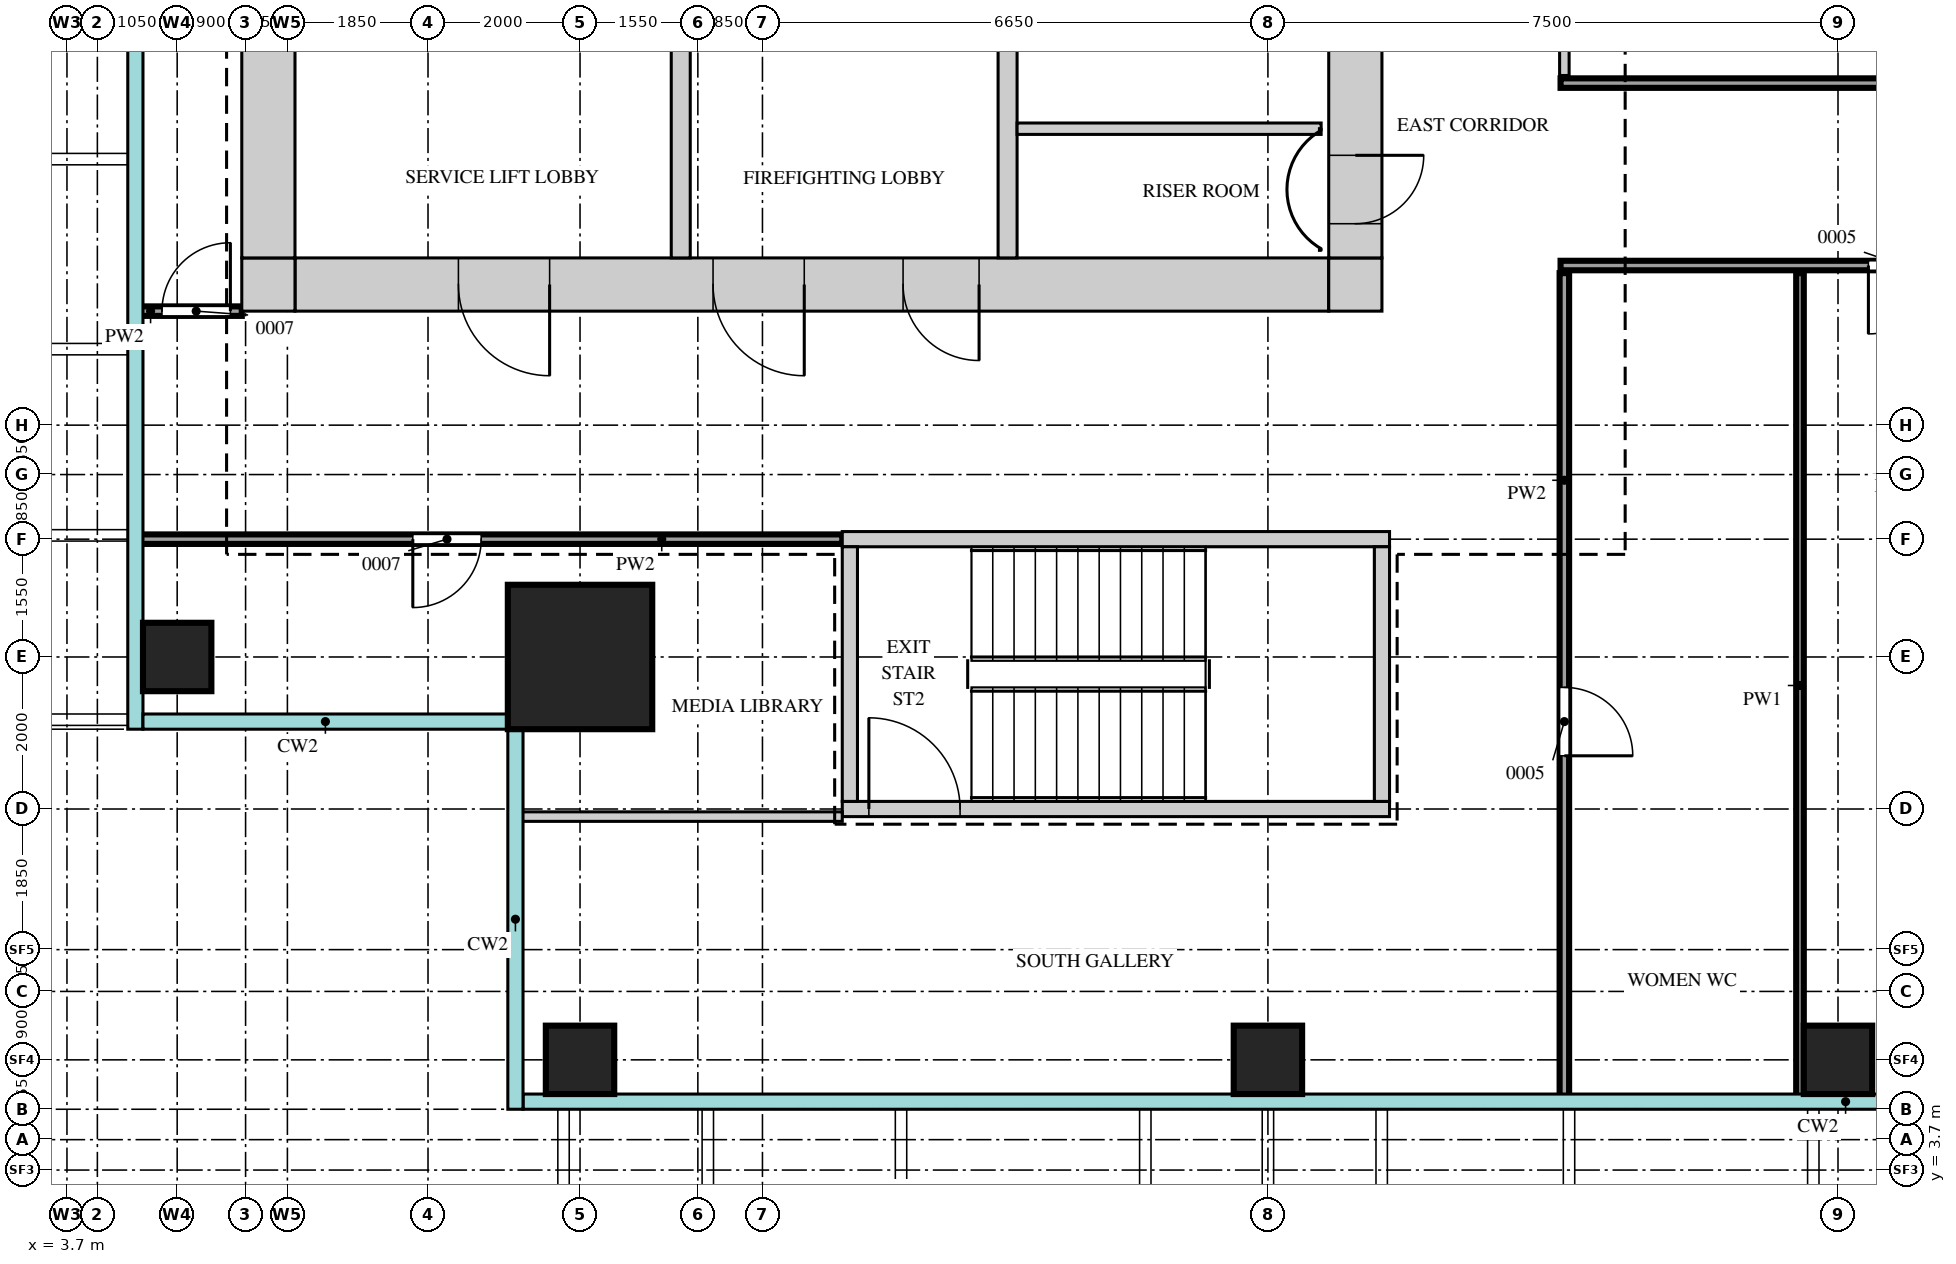
"""IFC4 building model, lengths in metres.
Left out: names, types, materials, properties, quantities, classifications, styles, units other than length and angle.
Written with IfcOpenShell. Run it as: python <this file> out.ifc"""

import sys

from ifc_helpers import new_model, si_unit, direction, frame, frame_2d, origin, origin_2d, place, context, subcontext, project, spatial, rectangle, extrude, source, transform, mapped, element, fill, save


model = new_model("IFC4")
c1 = context("Model", 3, precision=1e-05, world=origin(), true_north=direction((0.0, 1.0)))
c2 = subcontext(c1, "Body", "Model", "MODEL_VIEW")
j1 = project(units=[si_unit("LENGTHUNIT", "METRE"), si_unit("PLANEANGLEUNIT", "RADIAN")], contexts=[c1])
p1 = place(None, origin())
s1 = spatial("IfcSite", under=j1, at=p1, CompositionType="ELEMENT")
p2 = place(p1, origin())
s2 = spatial("IfcBuilding", under=s1, at=p2, CompositionType="ELEMENT")
p3 = place(p2, frame((0.0, 0.0, 246.2)))
s3 = spatial("IfcBuildingStorey", under=s2, at=p3, CompositionType="ELEMENT", Elevation=246.2)
m1 = source(origin(), c2, "Body", "SweptSolid", [
    extrude(rectangle(XDim=13.6, YDim=0.7, at=frame_2d((6.8, 0.0))), origin(), (0.0, 0.0, 1.0), 3.75),
])
p4 = place(p3, frame((6.7, 15.35, 0.0), z_axis=(0.0, 0.0, 1.0), x_axis=(1.0, 0.0, 0.0)))
e1 = element("IfcWall", 1, at=p4, inside=s3, PredefinedType="SHEAR", context=c2, shape_type="MappedRepresentation", body=[
    mapped(m1, transform((0.0, 0.0, 0.0))),
])
m2 = source(origin(), c2, "Body", "SweptSolid", [
    extrude(rectangle(XDim=1.2, YDim=2.1, at=frame_2d((0.6, 1.05))), frame((0.0, 0.36, 0.0), z_axis=(0.0, -1.0, 0.0), x_axis=(1.0, 0.0, 0.0)), (0.0, 0.0, 1.0), 0.72),
])
p5 = place(p4, frame((5.5, 0.0, 0.0)))
e2 = element("IfcOpeningElement", 2, at=p5, cuts=e1, PredefinedType="OPENING", context=c2, shape_type="MappedRepresentation", body=[
    mapped(m2, transform((0.0, 0.0, 0.0))),
])
p6 = place(p4, frame((2.15, 0.0, 0.0)))
e3 = element("IfcOpeningElement", 3, at=p6, cuts=e1, PredefinedType="OPENING", context=c2, shape_type="MappedRepresentation", body=[
    mapped(m2, transform((0.0, 0.0, 0.0))),
])
m3 = source(origin(), c2, "Body", "SweptSolid", [
    extrude(rectangle(XDim=1.0, YDim=2.1, at=frame_2d((0.5, 1.05))), frame((0.0, 0.36, 0.0), z_axis=(0.0, -1.0, 0.0), x_axis=(1.0, 0.0, 0.0)), (0.0, 0.0, 1.0), 0.72),
])
p7 = place(p4, frame((8.0, 0.0, 0.0)))
e4 = element("IfcOpeningElement", 4, at=p7, cuts=e1, PredefinedType="OPENING", context=c2, shape_type="MappedRepresentation", body=[
    mapped(m3, transform((0.0, 0.0, 0.0))),
])
m4 = source(origin(), c2, "Body", "SweptSolid", [
    extrude(rectangle(XDim=0.7, YDim=0.7, at=frame_2d((0.35, 0.0))), origin(), (0.0, 0.0, 1.0), 3.75),
])
for number, where, z_axis, x_axis in (
    (5, (20.3, 15.35, 0.0), (0.0, 0.0, 1.0), (1.0, 0.0, 0.0)),
    (6, (6.0, 15.35, 0.0), (0.0, 0.0, 1.0), (1.0, 0.0, 0.0)),
):
    element("IfcWall", number, at=place(p3, frame(where, z_axis=z_axis, x_axis=x_axis)), inside=s3, PredefinedType="SHEAR", context=c2, shape_type="MappedRepresentation", body=[
        mapped(m4, transform((0.0, 0.0, 0.0))),
    ])
m5 = source(origin(), c2, "Body", "SweptSolid", [
    extrude(rectangle(XDim=22.6, YDim=0.7, at=frame_2d((11.3, 0.0))), origin(), (0.0, 0.0, 1.0), 3.75),
])
p8 = place(p3, frame((20.65, 15.7, 0.0), z_axis=(0.0, 0.0, 1.0), x_axis=(0.0, 1.0, 0.0)))
e7 = element("IfcWall", 7, at=p8, inside=s3, PredefinedType="SHEAR", context=c2, shape_type="MappedRepresentation", body=[
    mapped(m5, transform((0.0, 0.0, 0.0))),
])
m6 = source(origin(), c2, "Body", "SweptSolid", [
    extrude(rectangle(XDim=1.8, YDim=2.1, at=frame_2d((0.9, 1.05))), frame((0.0, 0.36, 0.0), z_axis=(0.0, -1.0, 0.0), x_axis=(1.0, 0.0, 0.0)), (0.0, 0.0, 1.0), 0.72),
])
p9 = place(p8, frame((10.8, 0.0, 0.0)))
e8 = element("IfcOpeningElement", 8, at=p9, cuts=e7, PredefinedType="OPENING", context=c2, shape_type="MappedRepresentation", body=[
    mapped(m6, transform((0.0, 0.0, 0.0))),
])
m7 = source(origin(), c2, "Body", "SweptSolid", [
    extrude(rectangle(XDim=0.9, YDim=2.1, at=frame_2d((0.45, 1.05))), frame((0.0, 0.36, 0.0), z_axis=(0.0, -1.0, 0.0), x_axis=(1.0, 0.0, 0.0)), (0.0, 0.0, 1.0), 0.72),
])
p10 = place(p8, frame((0.45, 0.0, 0.0)))
e9 = element("IfcOpeningElement", 9, at=p10, cuts=e7, PredefinedType="OPENING", context=c2, shape_type="MappedRepresentation", body=[
    mapped(m7, transform((0.0, 0.0, 0.0))),
])
p11 = place(p8, frame((2.9, 0.0, 0.0)))
e10 = element("IfcOpeningElement", 10, at=p11, cuts=e7, PredefinedType="OPENING", context=c2, shape_type="MappedRepresentation", body=[
    mapped(m7, transform((0.0, 0.0, 0.0))),
])
p12 = place(p8, frame((5.65, 0.0, 0.0)))
e11 = element("IfcOpeningElement", 11, at=p12, cuts=e7, PredefinedType="OPENING", context=c2, shape_type="MappedRepresentation", body=[
    mapped(m7, transform((0.0, 0.0, 0.0))),
])
p13 = place(p3, frame((6.35, 15.7, 0.0), z_axis=(0.0, 0.0, 1.0), x_axis=(0.0, 1.0, 0.0)))
e12 = element("IfcWall", 12, at=p13, inside=s3, PredefinedType="SHEAR", context=c2, shape_type="MappedRepresentation", body=[
    mapped(m5, transform((0.0, 0.0, 0.0))),
])
m8 = source(origin(), c2, "Body", "SweptSolid", [
    extrude(rectangle(XDim=7.2, YDim=0.2, at=frame_2d((3.6, 0.0))), origin(), (0.0, 0.0, 1.0), 3.75),
])
p14 = place(p3, frame((13.9, 12.0, 0.0), z_axis=(0.0, 0.0, 1.0), x_axis=(1.0, 0.0, 0.0)))
e13 = element("IfcWall", 13, at=p14, inside=s3, PredefinedType="SHEAR", context=c2, shape_type="MappedRepresentation", body=[
    mapped(m8, transform((0.0, 0.0, 0.0))),
])
p15 = place(p3, frame((13.9, 8.45, 0.0), z_axis=(0.0, 0.0, 1.0), x_axis=(1.0, 0.0, 0.0)))
e14 = element("IfcWall", 14, at=p15, inside=s3, PredefinedType="SHEAR", context=c2, shape_type="MappedRepresentation", body=[
    mapped(m8, transform((0.0, 0.0, 0.0))),
])
m9 = source(origin(), c2, "Body", "SweptSolid", [
    extrude(rectangle(XDim=1.2, YDim=2.1, at=frame_2d((0.6, 1.05))), frame((0.0, 0.11, 0.0), z_axis=(0.0, -1.0, 0.0), x_axis=(1.0, 0.0, 0.0)), (0.0, 0.0, 1.0), 0.22),
])
p16 = place(p15, frame((0.35, 0.0, 0.0)))
e15 = element("IfcOpeningElement", 15, at=p16, cuts=e14, PredefinedType="OPENING", context=c2, shape_type="MappedRepresentation", body=[
    mapped(m9, transform((0.0, 0.0, 0.0))),
])
m10 = source(origin(), c2, "Body", "SweptSolid", [
    extrude(rectangle(XDim=3.35, YDim=0.2, at=frame_2d((1.675, 0.0))), origin(), (0.0, 0.0, 1.0), 3.75),
])
for number, where, z_axis, x_axis in (
    (16, (21.0, 8.55, 0.0), (0.0, 0.0, 1.0), (0.0, 1.0, 0.0)),
    (17, (14.0, 8.55, 0.0), (0.0, 0.0, 1.0), (0.0, 1.0, 0.0)),
):
    element("IfcWall", number, at=place(p3, frame(where, z_axis=z_axis, x_axis=x_axis)), inside=s3, PredefinedType="SHEAR", context=c2, shape_type="MappedRepresentation", body=[
        mapped(m10, transform((0.0, 0.0, 0.0))),
    ])
m11 = source(origin(), c2, "Body", "SweptSolid", [
    extrude(rectangle(XDim=3.5, YDim=0.25, at=frame_2d((1.75, 0.0))), origin(), (0.0, 0.0, 1.0), 3.75),
])
for number, where, z_axis, x_axis in (
    (18, (16.075, 15.7, 0.0), (0.0, 0.0, 1.0), (0.0, 1.0, 0.0)),
    (19, (11.775, 15.7, 0.0), (0.0, 0.0, 1.0), (0.0, 1.0, 0.0)),
):
    element("IfcWall", number, at=place(p3, frame(where, z_axis=z_axis, x_axis=x_axis)), inside=s3, PredefinedType="STANDARD", context=c2, shape_type="MappedRepresentation", body=[
        mapped(m11, transform((0.0, 0.0, 0.0))),
    ])
m12 = source(origin(), c2, "Body", "SweptSolid", [
    extrude(rectangle(XDim=1.9, YDim=1.9, at=origin_2d()), origin(), (0.0, 0.0, 1.0), 4.0),
])
p17 = place(p3, frame((10.45, 10.45, 0.0), z_axis=(0.0, 0.0, 1.0), x_axis=(1.0, 0.0, 0.0)))
e20 = element("IfcColumn", 20, at=p17, inside=s3, PredefinedType="COLUMN", context=c2, shape_type="MappedRepresentation", body=[
    mapped(m12, transform((0.0, 0.0, 0.0))),
])
m13 = source(origin(), c2, "Body", "SweptSolid", [
    extrude(rectangle(XDim=0.9, YDim=0.9, at=origin_2d()), origin(), (0.0, 0.0, 1.0), 3.75),
])
for number, where, z_axis, x_axis in (
    (21, (10.45, 5.15, 0.0), (0.0, 0.0, 1.0), (1.0, 0.0, 0.0)),
    (22, (19.5, 5.15, 0.0), (0.0, 0.0, 1.0), (1.0, 0.0, 0.0)),
    (23, (27.0, 5.15, 0.0), (0.0, 0.0, 1.0), (1.0, 0.0, 0.0)),
    (24, (5.15, 10.45, 0.0), (0.0, 0.0, 1.0), (1.0, 0.0, 0.0)),
):
    element("IfcColumn", number, at=place(p3, frame(where, z_axis=z_axis, x_axis=x_axis)), inside=s3, PredefinedType="COLUMN", context=c2, shape_type="MappedRepresentation", body=[
        mapped(m13, transform((0.0, 0.0, 0.0))),
    ])
m14 = source(origin(), c2, "Body", "SweptSolid", [
    extrude(rectangle(XDim=10.85, YDim=0.125, at=frame_2d((5.425, 0.0))), origin(), (0.0, 0.0, 1.0), 3.8),
])
p18 = place(p3, frame((23.4, 4.65, 0.0), z_axis=(0.0, 0.0, 1.0), x_axis=(0.0, 1.0, 0.0)))
e25 = element("IfcWall", 25, at=p18, inside=s3, PredefinedType="PARTITIONING", context=c2, shape_type="MappedRepresentation", body=[
    mapped(m14, transform((0.0, 0.0, 0.0))),
])
m15 = source(origin(), c2, "Body", "SweptSolid", [
    extrude(rectangle(XDim=0.9, YDim=2.1, at=frame_2d((0.45, 1.05))), frame((0.0, 0.073, 0.0), z_axis=(0.0, -1.0, 0.0), x_axis=(1.0, 0.0, 0.0)), (0.0, 0.0, 1.0), 0.145),
])
p19 = place(p18, frame((4.5, 0.0, 0.0)))
e26 = element("IfcOpeningElement", 26, at=p19, cuts=e25, PredefinedType="OPENING", context=c2, shape_type="MappedRepresentation", body=[
    mapped(m15, transform((0.0, 0.0, 0.0))),
])
m16 = source(origin(), c2, "Body", "SweptSolid", [
    extrude(rectangle(XDim=10.85, YDim=0.1, at=frame_2d((5.425, 0.0))), origin(), (0.0, 0.0, 1.0), 3.8),
])
p20 = place(p3, frame((26.5, 4.65, 0.0), z_axis=(0.0, 0.0, 1.0), x_axis=(0.0, 1.0, 0.0)))
e27 = element("IfcWall", 27, at=p20, inside=s3, PredefinedType="PARTITIONING", context=c2, shape_type="MappedRepresentation", body=[
    mapped(m16, transform((0.0, 0.0, 0.0))),
])
m17 = source(origin(), c2, "Body", "SweptSolid", [
    extrude(rectangle(XDim=4.25, YDim=0.125, at=frame_2d((2.125, 0.0))), origin(), (0.0, 0.0, 1.0), 3.8),
])
p21 = place(p3, frame((9.65, 8.35, 0.0), z_axis=(0.0, 0.0, 1.0), x_axis=(1.0, 0.0, 0.0)))
e28 = element("IfcWall", 28, at=p21, inside=s3, PredefinedType="PARTITIONING", context=c2, shape_type="MappedRepresentation", body=[
    mapped(m17, transform((0.0, 0.0, 0.0))),
])
m18 = source(origin(), c2, "Body", "SweptSolid", [
    extrude(rectangle(XDim=9.25, YDim=0.125, at=frame_2d((4.625, 0.0))), origin(), (0.0, 0.0, 1.0), 3.8),
])
p22 = place(p3, frame((4.65, 12.0, 0.0), z_axis=(0.0, 0.0, 1.0), x_axis=(1.0, 0.0, 0.0)))
e29 = element("IfcWall", 29, at=p22, inside=s3, PredefinedType="PARTITIONING", context=c2, shape_type="MappedRepresentation", body=[
    mapped(m18, transform((0.0, 0.0, 0.0))),
])
p23 = place(p22, frame((3.6, 0.0, 0.0)))
e30 = element("IfcOpeningElement", 30, at=p23, cuts=e29, PredefinedType="OPENING", context=c2, shape_type="MappedRepresentation", body=[
    mapped(m15, transform((0.0, 0.0, 0.0))),
])
m19 = source(origin(), c2, "Body", "SweptSolid", [
    extrude(rectangle(XDim=1.35, YDim=0.125, at=frame_2d((0.675, 0.0))), origin(), (0.0, 0.0, 1.0), 3.8),
])
p24 = place(p3, frame((4.65, 15.0, 0.0), z_axis=(0.0, 0.0, 1.0), x_axis=(1.0, 0.0, 0.0)))
e31 = element("IfcWall", 31, at=p24, inside=s3, PredefinedType="PARTITIONING", context=c2, shape_type="MappedRepresentation", body=[
    mapped(m19, transform((0.0, 0.0, 0.0))),
])
p25 = place(p24, frame((0.3, 0.0, 0.0)))
e32 = element("IfcOpeningElement", 32, at=p25, cuts=e31, PredefinedType="OPENING", context=c2, shape_type="MappedRepresentation", body=[
    mapped(m15, transform((0.0, 0.0, 0.0))),
])
m20 = source(origin(), c2, "Body", "SweptSolid", [
    extrude(rectangle(XDim=26.0, YDim=0.125, at=frame_2d((13.0, 0.0))), origin(), (0.0, 0.0, 1.0), 3.8),
])
p26 = place(p3, frame((23.35, 15.6, 0.0), z_axis=(0.0, 0.0, 1.0), x_axis=(1.0, 0.0, 0.0)))
e33 = element("IfcWall", 33, at=p26, inside=s3, PredefinedType="PARTITIONING", context=c2, shape_type="MappedRepresentation", body=[
    mapped(m20, transform((0.0, 0.0, 0.0))),
])
p27 = place(p26, frame((4.05, 0.0, 0.0)))
e34 = element("IfcOpeningElement", 34, at=p27, cuts=e33, PredefinedType="OPENING", context=c2, shape_type="MappedRepresentation", body=[
    mapped(m15, transform((0.0, 0.0, 0.0))),
])
m21 = source(origin(), c2, "Body", "SweptSolid", [
    extrude(rectangle(XDim=1.0, YDim=2.1, at=frame_2d((0.5, 1.05))), frame((0.0, 0.073, 0.0), z_axis=(0.0, -1.0, 0.0), x_axis=(1.0, 0.0, 0.0)), (0.0, 0.0, 1.0), 0.145),
])
p28 = place(p26, frame((6.85, 0.0, 0.0)))
e35 = element("IfcOpeningElement", 35, at=p28, cuts=e33, PredefinedType="OPENING", context=c2, shape_type="MappedRepresentation", body=[
    mapped(m21, transform((0.0, 0.0, 0.0))),
])
p29 = place(p26, frame((9.25, 0.0, 0.0)))
e36 = element("IfcOpeningElement", 36, at=p29, cuts=e33, PredefinedType="OPENING", context=c2, shape_type="MappedRepresentation", body=[
    mapped(m15, transform((0.0, 0.0, 0.0))),
])
m22 = source(origin(), c2, "Body", "SweptSolid", [
    extrude(rectangle(XDim=1.2, YDim=2.1, at=frame_2d((0.6, 1.05))), frame((0.0, 0.073, 0.0), z_axis=(0.0, -1.0, 0.0), x_axis=(1.0, 0.0, 0.0)), (0.0, 0.0, 1.0), 0.145),
])
p30 = place(p26, frame((18.05, 0.0, 0.0)))
e37 = element("IfcOpeningElement", 37, at=p30, cuts=e33, PredefinedType="OPENING", context=c2, shape_type="MappedRepresentation", body=[
    mapped(m22, transform((0.0, 0.0, 0.0))),
])
m23 = source(origin(), c2, "Body", "SweptSolid", [
    extrude(rectangle(XDim=4.0, YDim=0.15, at=frame_2d((2.0, 0.0))), origin(), (0.0, 0.0, 1.0), 3.8),
])
p31 = place(p3, frame((16.2, 17.4, 0.0), z_axis=(0.0, 0.0, 1.0), x_axis=(1.0, 0.0, 0.0)))
e38 = element("IfcWall", 38, at=p31, inside=s3, PredefinedType="PARTITIONING", context=c2, shape_type="MappedRepresentation", body=[
    mapped(m23, transform((0.0, 0.0, 0.0))),
])
p32 = place(p3, frame((23.35, 18.0, 0.0), z_axis=(0.0, 0.0, 1.0), x_axis=(1.0, 0.0, 0.0)))
e39 = element("IfcWall", 39, at=p32, inside=s3, PredefinedType="PARTITIONING", context=c2, shape_type="MappedRepresentation", body=[
    mapped(m20, transform((0.0, 0.0, 0.0))),
])
p33 = place(p32, frame((12.5, 0.0, 0.0)))
e40 = element("IfcOpeningElement", 40, at=p33, cuts=e39, PredefinedType="OPENING", context=c2, shape_type="MappedRepresentation", body=[
    mapped(m22, transform((0.0, 0.0, 0.0))),
])
m24 = source(origin(), c2, "Body", "SweptSolid", [
    extrude(rectangle(XDim=20.8, YDim=0.125, at=frame_2d((10.4, 0.0))), origin(), (0.0, 0.0, 1.0), 3.8),
])
p34 = place(p3, frame((23.4, 18.1, 0.0), z_axis=(0.0, 0.0, 1.0), x_axis=(0.0, 1.0, 0.0)))
e41 = element("IfcWall", 41, at=p34, inside=s3, PredefinedType="PARTITIONING", context=c2, shape_type="MappedRepresentation", body=[
    mapped(m24, transform((0.0, 0.0, 0.0))),
])
p35 = place(p34, frame((12.05, 0.0, 0.0)))
e42 = element("IfcOpeningElement", 42, at=p35, cuts=e41, PredefinedType="OPENING", context=c2, shape_type="MappedRepresentation", body=[
    mapped(m22, transform((0.0, 0.0, 0.0))),
])
m25 = source(origin(), c2, "Body", "SweptSolid", [
    extrude(rectangle(XDim=0.9, YDim=2.1, at=frame_2d((0.45, 1.05))), frame((0.0, 0.3, 0.0), z_axis=(0.0, -1.0, 0.0), x_axis=(1.0, 0.0, 0.0)), (0.0, 0.0, 1.0), 0.6),
])
p36 = place(p10, origin())
e43 = element("IfcDoor", 43, at=p36, inside=s3, OperationType="SINGLE_SWING_RIGHT", PredefinedType="DOOR", context=c2, shape_type="MappedRepresentation", body=[
    mapped(m25, transform((0.0, 0.0, 0.0))),
])
fill(e9, e43)
m26 = source(origin(), c2, "Body", "SweptSolid", [
    extrude(rectangle(XDim=1.2, YDim=2.1, at=frame_2d((0.6, 1.05))), frame((0.0, 0.3, 0.0), z_axis=(0.0, -1.0, 0.0), x_axis=(1.0, 0.0, 0.0)), (0.0, 0.0, 1.0), 0.6),
])
p37 = place(p5, origin())
e44 = element("IfcDoor", 44, at=p37, inside=s3, OperationType="SINGLE_SWING_RIGHT", PredefinedType="DOOR", context=c2, shape_type="MappedRepresentation", body=[
    mapped(m26, transform((0.0, 0.0, 0.0))),
])
fill(e2, e44)
p38 = place(p6, origin())
e45 = element("IfcDoor", 45, at=p38, inside=s3, OperationType="SINGLE_SWING_RIGHT", PredefinedType="DOOR", context=c2, shape_type="MappedRepresentation", body=[
    mapped(m26, transform((0.0, 0.0, 0.0))),
])
fill(e3, e45)
m27 = source(origin(), c2, "Body", "SweptSolid", [
    extrude(rectangle(XDim=1.0, YDim=2.1, at=frame_2d((0.5, 1.05))), frame((0.0, 0.3, 0.0), z_axis=(0.0, -1.0, 0.0), x_axis=(1.0, 0.0, 0.0)), (0.0, 0.0, 1.0), 0.6),
])
p39 = place(p7, origin())
e46 = element("IfcDoor", 46, at=p39, inside=s3, OperationType="SINGLE_SWING_RIGHT", PredefinedType="DOOR", context=c2, shape_type="MappedRepresentation", body=[
    mapped(m27, transform((0.0, 0.0, 0.0))),
])
fill(e4, e46)
m28 = source(origin(), c2, "Body", "SweptSolid", [
    extrude(rectangle(XDim=0.9, YDim=2.1, at=frame_2d((0.45, 1.05))), frame((0.0, 0.025, 0.0), z_axis=(0.0, -1.0, 0.0), x_axis=(1.0, 0.0, 0.0)), (0.0, 0.0, 1.0), 0.05),
])
p40 = place(p25, origin())
e47 = element("IfcDoor", 47, at=p40, inside=s3, OperationType="SINGLE_SWING_LEFT", PredefinedType="DOOR", context=c2, shape_type="MappedRepresentation", body=[
    mapped(m28, transform((0.0, 0.0, 0.0))),
])
fill(e32, e47)
p41 = place(p23, origin())
e48 = element("IfcDoor", 48, at=p41, inside=s3, OperationType="SINGLE_SWING_LEFT", PredefinedType="DOOR", context=c2, shape_type="MappedRepresentation", body=[
    mapped(m28, transform((0.0, 0.0, 0.0))),
])
fill(e30, e48)
p42 = place(p19, origin())
e49 = element("IfcDoor", 49, at=p42, inside=s3, OperationType="SINGLE_SWING_LEFT", PredefinedType="DOOR", context=c2, shape_type="MappedRepresentation", body=[
    mapped(m28, transform((0.0, 0.0, 0.0))),
])
fill(e26, e49)
p43 = place(p27, origin())
e50 = element("IfcDoor", 50, at=p43, inside=s3, OperationType="SINGLE_SWING_LEFT", PredefinedType="DOOR", context=c2, shape_type="MappedRepresentation", body=[
    mapped(m28, transform((0.0, 0.0, 0.0))),
])
fill(e34, e50)
m29 = source(origin(), c2, "Body", "SweptSolid", [
    extrude(rectangle(XDim=1.2, YDim=2.1, at=frame_2d((0.6, 1.05))), frame((0.0, 0.025, 0.0), z_axis=(0.0, -1.0, 0.0), x_axis=(1.0, 0.0, 0.0)), (0.0, 0.0, 1.0), 0.05),
])
p44 = place(p16, origin())
e51 = element("IfcDoor", 51, at=p44, inside=s3, OperationType="SINGLE_SWING_RIGHT", PredefinedType="DOOR", context=c2, shape_type="MappedRepresentation", body=[
    mapped(m29, transform((0.0, 0.0, 0.0))),
])
fill(e15, e51)
save(model, sys.argv[1])
